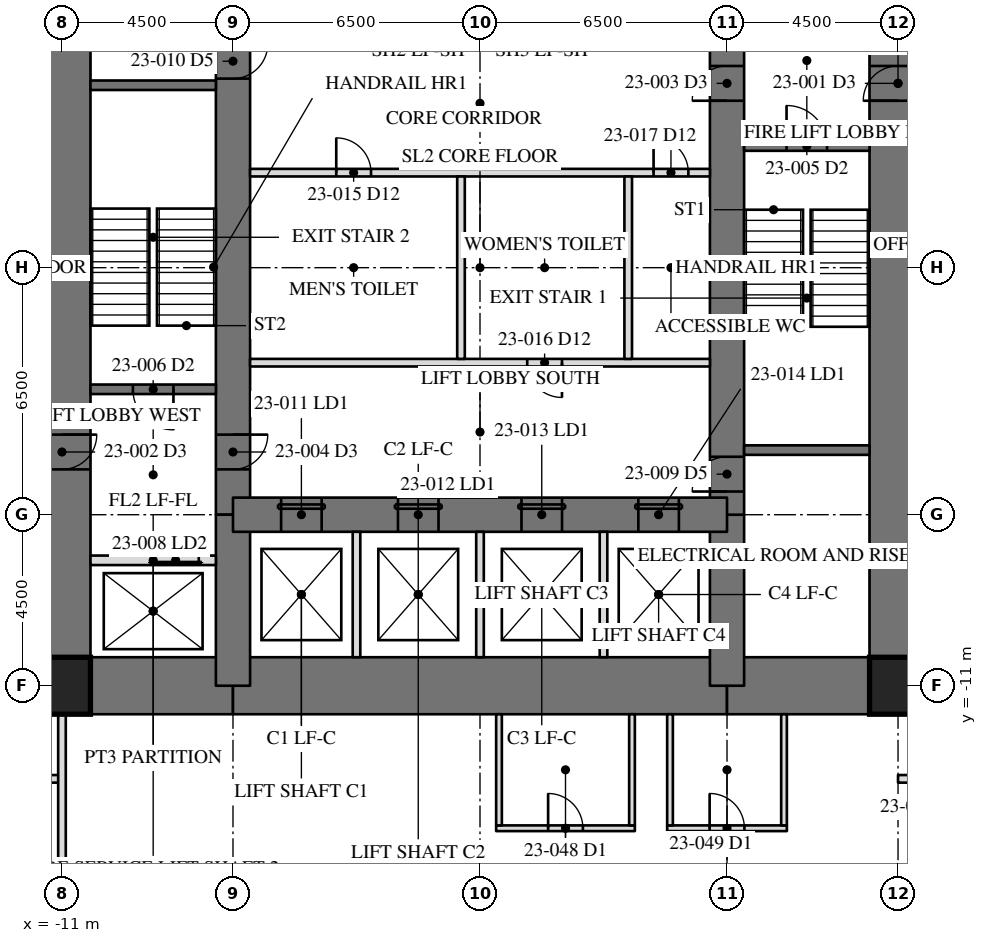
"""IFC4 building model, lengths in metres.
Left out: names, types, materials, properties, quantities, classifications, styles, units other than length and angle.
Written with IfcOpenShell. Run it as: python <this file> out.ifc"""

import sys

from ifc_helpers import new_model, si_unit, direction, frame, frame_2d, origin, origin_2d, place, context, subcontext, project, spatial, rectangle, hollow_rectangle, extrude, element, fill, save


model = new_model("IFC4")
c1 = context("Model", 3, precision=1e-05, world=origin(), true_north=direction((0.0, 1.0)))
c2 = subcontext(c1, "Body", "Model", "MODEL_VIEW")
j1 = project(units=[si_unit("LENGTHUNIT", "METRE"), si_unit("PLANEANGLEUNIT", "RADIAN")], contexts=[c1])
p1 = place(None, origin())
s1 = spatial("IfcSite", under=j1, at=p1, CompositionType="ELEMENT")
p2 = place(p1, origin())
s2 = spatial("IfcBuilding", under=s1, at=p2, CompositionType="ELEMENT")
p3 = place(p2, frame((0.0, 0.0, 100.8)))
s3 = spatial("IfcBuildingStorey", under=s2, at=p3, CompositionType="ELEMENT", Elevation=100.8)
p4 = place(p3, frame((11.0, -11.0, 0.0), z_axis=(0.0, 0.0, 1.0), x_axis=(0.0, 1.0, 0.0)))
e1 = element("IfcWall", 1, at=p4, inside=s3, PredefinedType="SHEAR", context=c2, shape_type="SweptSolid", body=[
    extrude(rectangle(XDim=22.0, YDim=1.5, at=frame_2d((11.0, 0.0))), origin(), (0.0, 0.0, 1.0), 4.1),
])
p5 = place(p4, frame((15.393, 0.0, 0.0)))
e2 = element("IfcOpeningElement", 2, at=p5, cuts=e1, PredefinedType="OPENING", context=c2, shape_type="SweptSolid", body=[
    extrude(rectangle(XDim=0.915, YDim=2.134, at=frame_2d((0.458, 1.067))), frame((0.0, 0.76, 0.0), z_axis=(0.0, -1.0, 0.0), x_axis=(1.0, 0.0, 0.0)), (0.0, 0.0, 1.0), 1.52),
])
p6 = place(p3, frame((-11.0, 11.0, 0.0), z_axis=(0.0, 0.0, 1.0), x_axis=(0.0, -1.0, 0.0)))
e3 = element("IfcWall", 3, at=p6, inside=s3, PredefinedType="SHEAR", context=c2, shape_type="SweptSolid", body=[
    extrude(rectangle(XDim=22.0, YDim=1.5, at=frame_2d((11.0, 0.0))), origin(), (0.0, 0.0, 1.0), 4.1),
])
p7 = place(p6, frame((15.393, 0.0, 0.0)))
e4 = element("IfcOpeningElement", 4, at=p7, cuts=e3, PredefinedType="OPENING", context=c2, shape_type="SweptSolid", body=[
    extrude(rectangle(XDim=0.915, YDim=2.134, at=frame_2d((0.458, 1.067))), frame((0.0, 0.76, 0.0), z_axis=(0.0, -1.0, 0.0), x_axis=(1.0, 0.0, 0.0)), (0.0, 0.0, 1.0), 1.52),
])
p8 = place(p3, frame((-11.0, -11.0, 0.0), z_axis=(0.0, 0.0, 1.0), x_axis=(1.0, 0.0, 0.0)))
e5 = element("IfcWall", 5, at=p8, inside=s3, PredefinedType="SHEAR", context=c2, shape_type="SweptSolid", body=[
    extrude(rectangle(XDim=4.5, YDim=1.5, at=frame_2d((2.25, 0.0))), origin(), (0.0, 0.0, 1.0), 4.1),
])
p9 = place(p3, frame((-6.5, -11.0, 0.0), z_axis=(0.0, 0.0, 1.0), x_axis=(1.0, 0.0, 0.0)))
e6 = element("IfcWall", 6, at=p9, inside=s3, PredefinedType="SHEAR", context=c2, shape_type="SweptSolid", body=[
    extrude(rectangle(XDim=13.0, YDim=1.5, at=frame_2d((6.5, 0.0))), origin(), (0.0, 0.0, 1.0), 4.1),
])
p10 = place(p3, frame((6.5, -11.0, 0.0), z_axis=(0.0, 0.0, 1.0), x_axis=(1.0, 0.0, 0.0)))
e7 = element("IfcWall", 7, at=p10, inside=s3, PredefinedType="SHEAR", context=c2, shape_type="SweptSolid", body=[
    extrude(rectangle(XDim=4.5, YDim=1.5, at=frame_2d((2.25, 0.0))), origin(), (0.0, 0.0, 1.0), 4.1),
])
p11 = place(p3, frame((6.5, -11.0, 0.0), z_axis=(0.0, 0.0, 1.0), x_axis=(0.0, 1.0, 0.0)))
e8 = element("IfcWall", 8, at=p11, inside=s3, PredefinedType="SHEAR", context=c2, shape_type="SweptSolid", body=[
    extrude(rectangle(XDim=4.5, YDim=0.9, at=frame_2d((2.25, 0.0))), origin(), (0.0, 0.0, 1.0), 4.1),
])
p12 = place(p3, frame((6.5, -6.5, 0.0), z_axis=(0.0, 0.0, 1.0), x_axis=(0.0, 1.0, 0.0)))
e9 = element("IfcWall", 9, at=p12, inside=s3, PredefinedType="SHEAR", context=c2, shape_type="SweptSolid", body=[
    extrude(rectangle(XDim=13.0, YDim=0.9, at=frame_2d((6.5, 0.0))), origin(), (0.0, 0.0, 1.0), 4.1),
])
p13 = place(p12, frame((10.893, 0.0, 0.0)))
e10 = element("IfcOpeningElement", 10, at=p13, cuts=e9, PredefinedType="OPENING", context=c2, shape_type="SweptSolid", body=[
    extrude(rectangle(XDim=0.915, YDim=2.134, at=frame_2d((0.458, 1.067))), frame((0.0, 0.46, 0.0), z_axis=(0.0, -1.0, 0.0), x_axis=(1.0, 0.0, 0.0)), (0.0, 0.0, 1.0), 0.92),
])
p14 = place(p12, frame((0.61, 0.0, 0.0)))
e11 = element("IfcOpeningElement", 11, at=p14, cuts=e9, PredefinedType="OPENING", context=c2, shape_type="SweptSolid", body=[
    extrude(rectangle(XDim=0.915, YDim=2.134, at=frame_2d((0.458, 1.067))), frame((0.0, 0.46, 0.0), z_axis=(0.0, -1.0, 0.0), x_axis=(1.0, 0.0, 0.0)), (0.0, 0.0, 1.0), 0.92),
])
p15 = place(p3, frame((-6.5, 6.5, 0.0), z_axis=(0.0, 0.0, 1.0), x_axis=(0.0, -1.0, 0.0)))
e12 = element("IfcWall", 12, at=p15, inside=s3, PredefinedType="SHEAR", context=c2, shape_type="SweptSolid", body=[
    extrude(rectangle(XDim=13.0, YDim=0.9, at=frame_2d((6.5, 0.0))), origin(), (0.0, 0.0, 1.0), 4.1),
])
p16 = place(p15, frame((10.893, 0.0, 0.0)))
e13 = element("IfcOpeningElement", 13, at=p16, cuts=e12, PredefinedType="OPENING", context=c2, shape_type="SweptSolid", body=[
    extrude(rectangle(XDim=0.915, YDim=2.134, at=frame_2d((0.458, 1.067))), frame((0.0, 0.46, 0.0), z_axis=(0.0, -1.0, 0.0), x_axis=(1.0, 0.0, 0.0)), (0.0, 0.0, 1.0), 0.92),
])
p17 = place(p15, frame((0.61, 0.0, 0.0)))
e14 = element("IfcOpeningElement", 14, at=p17, cuts=e12, PredefinedType="OPENING", context=c2, shape_type="SweptSolid", body=[
    extrude(rectangle(XDim=0.915, YDim=2.134, at=frame_2d((0.458, 1.067))), frame((0.0, 0.46, 0.0), z_axis=(0.0, -1.0, 0.0), x_axis=(1.0, 0.0, 0.0)), (0.0, 0.0, 1.0), 0.92),
])
p18 = place(p3, frame((-6.5, -6.5, 0.0), z_axis=(0.0, 0.0, 1.0), x_axis=(0.0, -1.0, 0.0)))
e15 = element("IfcWall", 15, at=p18, inside=s3, PredefinedType="SHEAR", context=c2, shape_type="SweptSolid", body=[
    extrude(rectangle(XDim=4.5, YDim=0.9, at=frame_2d((2.25, 0.0))), origin(), (0.0, 0.0, 1.0), 4.1),
])
p19 = place(p3, frame((-6.5, -6.5, 0.0), z_axis=(0.0, 0.0, 1.0), x_axis=(1.0, 0.0, 0.0)))
e16 = element("IfcWall", 16, at=p19, inside=s3, PredefinedType="SHEAR", context=c2, shape_type="SweptSolid", body=[
    extrude(rectangle(XDim=13.0, YDim=0.9, at=frame_2d((6.5, 0.0))), origin(), (0.0, 0.0, 1.0), 4.1),
])
p20 = place(p19, frame((1.267, 0.0, 0.0)))
e17 = element("IfcOpeningElement", 17, at=p20, cuts=e16, PredefinedType="OPENING", context=c2, shape_type="SweptSolid", body=[
    extrude(rectangle(XDim=1.067, YDim=2.134, at=frame_2d((0.533, 1.067))), frame((0.0, 0.46, 0.0), z_axis=(0.0, -1.0, 0.0), x_axis=(1.0, 0.0, 0.0)), (0.0, 0.0, 1.0), 0.92),
])
p21 = place(p19, frame((4.342, 0.0, 0.0)))
e18 = element("IfcOpeningElement", 18, at=p21, cuts=e16, PredefinedType="OPENING", context=c2, shape_type="SweptSolid", body=[
    extrude(rectangle(XDim=1.067, YDim=2.134, at=frame_2d((0.533, 1.067))), frame((0.0, 0.46, 0.0), z_axis=(0.0, -1.0, 0.0), x_axis=(1.0, 0.0, 0.0)), (0.0, 0.0, 1.0), 0.92),
])
p22 = place(p19, frame((7.592, 0.0, 0.0)))
e19 = element("IfcOpeningElement", 19, at=p22, cuts=e16, PredefinedType="OPENING", context=c2, shape_type="SweptSolid", body=[
    extrude(rectangle(XDim=1.067, YDim=2.134, at=frame_2d((0.533, 1.067))), frame((0.0, 0.46, 0.0), z_axis=(0.0, -1.0, 0.0), x_axis=(1.0, 0.0, 0.0)), (0.0, 0.0, 1.0), 0.92),
])
p23 = place(p19, frame((10.667, 0.0, 0.0)))
e20 = element("IfcOpeningElement", 20, at=p23, cuts=e16, PredefinedType="OPENING", context=c2, shape_type="SweptSolid", body=[
    extrude(rectangle(XDim=1.067, YDim=2.134, at=frame_2d((0.533, 1.067))), frame((0.0, 0.46, 0.0), z_axis=(0.0, -1.0, 0.0), x_axis=(1.0, 0.0, 0.0)), (0.0, 0.0, 1.0), 0.92),
])
for number, where, z_axis, x_axis in (
    (21, (-11.0, -11.0, 0.0), (0.0, 0.0, 1.0), (1.0, 0.0, 0.0)),
    (22, (11.0, -11.0, 0.0), (0.0, 0.0, 1.0), (1.0, 0.0, 0.0)),
):
    element("IfcColumn", number, at=place(p3, frame(where, z_axis=z_axis, x_axis=x_axis)), inside=s3, PredefinedType="COLUMN", context=c2, shape_type="SweptSolid", body=[
        extrude(hollow_rectangle(XDim=1.499, YDim=1.499, WallThickness=0.102, at=origin_2d()), origin(), (0.0, 0.0, 1.0), 4.1),
    ])
for number, where, z_axis, x_axis in (
    (23, (6.95, -4.8, 0.0), (0.0, 0.0, 1.0), (1.0, 0.0, 0.0)),
    (24, (-6.95, 4.8, 0.0), (0.0, 0.0, 1.0), (-1.0, 0.0, 0.0)),
):
    element("IfcWall", number, at=place(p3, frame(where, z_axis=z_axis, x_axis=x_axis)), inside=s3, PredefinedType="SOLIDWALL", context=c2, shape_type="SweptSolid", body=[
        extrude(rectangle(XDim=3.3, YDim=0.25, at=frame_2d((1.65, 0.0))), origin(), (0.0, 0.0, 1.0), 3.91),
    ])
p24 = place(p3, frame((6.95, 3.2, 0.0), z_axis=(0.0, 0.0, 1.0), x_axis=(1.0, 0.0, 0.0)))
e25 = element("IfcWall", 25, at=p24, inside=s3, PredefinedType="SOLIDWALL", context=c2, shape_type="SweptSolid", body=[
    extrude(rectangle(XDim=3.3, YDim=0.25, at=frame_2d((1.65, 0.0))), origin(), (0.0, 0.0, 1.0), 3.91),
])
p25 = place(p24, frame((1.116, 0.0, 0.0)))
e26 = element("IfcOpeningElement", 26, at=p25, cuts=e25, PredefinedType="OPENING", context=c2, shape_type="SweptSolid", body=[
    extrude(rectangle(XDim=1.067, YDim=2.134, at=frame_2d((0.533, 1.067))), frame((0.0, 0.135, 0.0), z_axis=(0.0, -1.0, 0.0), x_axis=(1.0, 0.0, 0.0)), (0.0, 0.0, 1.0), 0.27),
])
p26 = place(p3, frame((-6.95, -3.2, 0.0), z_axis=(0.0, 0.0, 1.0), x_axis=(-1.0, 0.0, 0.0)))
e27 = element("IfcWall", 27, at=p26, inside=s3, PredefinedType="SOLIDWALL", context=c2, shape_type="SweptSolid", body=[
    extrude(rectangle(XDim=3.3, YDim=0.25, at=frame_2d((1.65, 0.0))), origin(), (0.0, 0.0, 1.0), 3.91),
])
p27 = place(p26, frame((1.116, 0.0, 0.0)))
e28 = element("IfcOpeningElement", 28, at=p27, cuts=e27, PredefinedType="OPENING", context=c2, shape_type="SweptSolid", body=[
    extrude(rectangle(XDim=1.067, YDim=2.134, at=frame_2d((0.533, 1.067))), frame((0.0, 0.135, 0.0), z_axis=(0.0, -1.0, 0.0), x_axis=(1.0, 0.0, 0.0)), (0.0, 0.0, 1.0), 0.27),
])
p28 = place(p3, frame((-6.95, -7.7, 0.0), z_axis=(0.0, 0.0, 1.0), x_axis=(-1.0, 0.0, 0.0)))
e29 = element("IfcWall", 29, at=p28, inside=s3, PredefinedType="PARTITIONING", context=c2, shape_type="SweptSolid", body=[
    extrude(rectangle(XDim=3.3, YDim=0.25, at=frame_2d((1.65, 0.0))), origin(), (0.0, 0.0, 1.0), 3.91),
])
p29 = place(p28, frame((0.45, 0.0, 0.0)))
e30 = element("IfcOpeningElement", 30, at=p29, cuts=e29, PredefinedType="OPENING", context=c2, shape_type="SweptSolid", body=[
    extrude(rectangle(XDim=1.219, YDim=2.134, at=frame_2d((0.609, 1.067))), frame((0.0, 0.135, 0.0), z_axis=(0.0, -1.0, 0.0), x_axis=(1.0, 0.0, 0.0)), (0.0, 0.0, 1.0), 0.27),
])
p30 = place(p3, frame((-6.05, 2.5, 0.0), z_axis=(0.0, 0.0, 1.0), x_axis=(1.0, 0.0, 0.0)))
e31 = element("IfcWall", 31, at=p30, inside=s3, PredefinedType="PARTITIONING", context=c2, shape_type="SweptSolid", body=[
    extrude(rectangle(XDim=12.1, YDim=0.2, at=frame_2d((6.05, 0.0))), origin(), (0.0, 0.0, 1.0), 3.91),
])
p31 = place(p30, frame((2.268, 0.0, 0.0)))
e32 = element("IfcOpeningElement", 32, at=p31, cuts=e31, PredefinedType="OPENING", context=c2, shape_type="SweptSolid", body=[
    extrude(rectangle(XDim=0.915, YDim=2.134, at=frame_2d((0.458, 1.067))), frame((0.0, 0.11, 0.0), z_axis=(0.0, -1.0, 0.0), x_axis=(1.0, 0.0, 0.0)), (0.0, 0.0, 1.0), 0.22),
])
p32 = place(p30, frame((10.617, 0.0, 0.0)))
e33 = element("IfcOpeningElement", 33, at=p32, cuts=e31, PredefinedType="OPENING", context=c2, shape_type="SweptSolid", body=[
    extrude(rectangle(XDim=0.915, YDim=2.134, at=frame_2d((0.458, 1.067))), frame((0.0, 0.11, 0.0), z_axis=(0.0, -1.0, 0.0), x_axis=(1.0, 0.0, 0.0)), (0.0, 0.0, 1.0), 0.22),
])
p33 = place(p3, frame((6.05, -2.5, 0.0), z_axis=(0.0, 0.0, 1.0), x_axis=(-1.0, 0.0, 0.0)))
e34 = element("IfcWall", 34, at=p33, inside=s3, PredefinedType="PARTITIONING", context=c2, shape_type="SweptSolid", body=[
    extrude(rectangle(XDim=12.1, YDim=0.2, at=frame_2d((6.05, 0.0))), origin(), (0.0, 0.0, 1.0), 3.91),
])
p34 = place(p33, frame((3.893, 0.0, 0.0)))
e35 = element("IfcOpeningElement", 35, at=p34, cuts=e34, PredefinedType="OPENING", context=c2, shape_type="SweptSolid", body=[
    extrude(rectangle(XDim=0.915, YDim=2.134, at=frame_2d((0.458, 1.067))), frame((0.0, 0.11, 0.0), z_axis=(0.0, -1.0, 0.0), x_axis=(1.0, 0.0, 0.0)), (0.0, 0.0, 1.0), 0.22),
])
for number, where, z_axis, x_axis in (
    (36, (-3.25, -10.25, 0.0), (0.0, 0.0, 1.0), (0.0, 1.0, 0.0)),
    (37, (0.0, -10.25, 0.0), (0.0, 0.0, 1.0), (0.0, 1.0, 0.0)),
    (38, (3.25, -10.25, 0.0), (0.0, 0.0, 1.0), (0.0, 1.0, 0.0)),
):
    element("IfcWall", number, at=place(p3, frame(where, z_axis=z_axis, x_axis=x_axis)), inside=s3, PredefinedType="PARTITIONING", context=c2, shape_type="SweptSolid", body=[
        extrude(rectangle(XDim=3.3, YDim=0.2, at=frame_2d((1.65, 0.0))), origin(), (0.0, 0.0, 1.0), 3.91),
    ])
for number, where, z_axis, x_axis in (
    (39, (-0.5, -2.4, 0.0), (0.0, 0.0, 1.0), (0.0, 1.0, 0.0)),
    (40, (3.9, -2.4, 0.0), (0.0, 0.0, 1.0), (0.0, 1.0, 0.0)),
):
    element("IfcWall", number, at=place(p3, frame(where, z_axis=z_axis, x_axis=x_axis)), inside=s3, PredefinedType="PARTITIONING", context=c2, shape_type="SweptSolid", body=[
        extrude(rectangle(XDim=4.8, YDim=0.2, at=frame_2d((2.4, 0.0))), origin(), (0.0, 0.0, 1.0), 3.91),
    ])
for number, where, z_axis, x_axis in (
    (41, (11.0, -13.45, 0.0), (0.0, 0.0, 1.0), (1.0, 0.0, 0.0)),
    (42, (-11.0, -13.45, 0.0), (0.0, 0.0, 1.0), (-1.0, 0.0, 0.0)),
):
    element("IfcWall", number, at=place(p3, frame(where, z_axis=z_axis, x_axis=x_axis)), inside=s3, PredefinedType="PARTITIONING", context=c2, shape_type="SweptSolid", body=[
        extrude(rectangle(XDim=2.55, YDim=0.2, at=frame_2d((1.275, 0.0))), origin(), (0.0, 0.0, 1.0), 3.91),
    ])
p35 = place(p3, frame((-11.0, -11.75, 0.0), z_axis=(0.0, 0.0, 1.0), x_axis=(0.0, -1.0, 0.0)))
e43 = element("IfcWall", 43, at=p35, inside=s3, PredefinedType="PARTITIONING", context=c2, shape_type="SweptSolid", body=[
    extrude(rectangle(XDim=10.665, YDim=0.2, at=frame_2d((5.333, 0.0))), origin(), (0.0, 0.0, 1.0), 3.326),
])
p36 = place(p3, frame((0.425, -14.75, 0.0), z_axis=(0.0, 0.0, 1.0), x_axis=(1.0, 0.0, 0.0)))
e44 = element("IfcWall", 44, at=p36, inside=s3, PredefinedType="PARTITIONING", context=c2, shape_type="SweptSolid", body=[
    extrude(rectangle(XDim=3.65, YDim=0.15, at=frame_2d((1.825, 0.0))), origin(), (0.0, 0.0, 1.0), 3.91),
])
p37 = place(p36, frame((1.367, 0.0, 0.0)))
e45 = element("IfcOpeningElement", 45, at=p37, cuts=e44, PredefinedType="OPENING", context=c2, shape_type="SweptSolid", body=[
    extrude(rectangle(XDim=0.915, YDim=2.134, at=frame_2d((0.458, 1.067))), frame((0.0, 0.085, 0.0), z_axis=(0.0, -1.0, 0.0), x_axis=(1.0, 0.0, 0.0)), (0.0, 0.0, 1.0), 0.17),
])
for number, where, z_axis, x_axis in (
    (46, (0.5, -14.675, 0.0), (0.0, 0.0, 1.0), (0.0, 1.0, 0.0)),
    (47, (4.0, -14.675, 0.0), (0.0, 0.0, 1.0), (0.0, 1.0, 0.0)),
):
    element("IfcWall", number, at=place(p3, frame(where, z_axis=z_axis, x_axis=x_axis)), inside=s3, PredefinedType="PARTITIONING", context=c2, shape_type="SweptSolid", body=[
        extrude(rectangle(XDim=2.925, YDim=0.15, at=frame_2d((1.462, 0.0))), origin(), (0.0, 0.0, 1.0), 3.91),
    ])
p38 = place(p3, frame((4.925, -14.75, 0.0), z_axis=(0.0, 0.0, 1.0), x_axis=(1.0, 0.0, 0.0)))
e48 = element("IfcWall", 48, at=p38, inside=s3, PredefinedType="PARTITIONING", context=c2, shape_type="SweptSolid", body=[
    extrude(rectangle(XDim=3.15, YDim=0.15, at=frame_2d((1.575, 0.0))), origin(), (0.0, 0.0, 1.0), 3.91),
])
p39 = place(p38, frame((1.117, 0.0, 0.0)))
e49 = element("IfcOpeningElement", 49, at=p39, cuts=e48, PredefinedType="OPENING", context=c2, shape_type="SweptSolid", body=[
    extrude(rectangle(XDim=0.915, YDim=2.134, at=frame_2d((0.458, 1.067))), frame((0.0, 0.085, 0.0), z_axis=(0.0, -1.0, 0.0), x_axis=(1.0, 0.0, 0.0)), (0.0, 0.0, 1.0), 0.17),
])
for number, where, z_axis, x_axis in (
    (50, (5.0, -14.675, 0.0), (0.0, 0.0, 1.0), (0.0, 1.0, 0.0)),
    (51, (8.0, -14.675, 0.0), (0.0, 0.0, 1.0), (0.0, 1.0, 0.0)),
):
    element("IfcWall", number, at=place(p3, frame(where, z_axis=z_axis, x_axis=x_axis)), inside=s3, PredefinedType="PARTITIONING", context=c2, shape_type="SweptSolid", body=[
        extrude(rectangle(XDim=2.925, YDim=0.15, at=frame_2d((1.462, 0.0))), origin(), (0.0, 0.0, 1.0), 3.91),
    ])
p40 = place(p13, origin())
e52 = element("IfcDoor", 52, at=p40, inside=s3, OperationType="SINGLE_SWING_RIGHT", PredefinedType="DOOR", context=c2, shape_type="SweptSolid", body=[
    extrude(rectangle(XDim=0.915, YDim=2.134, at=frame_2d((0.458, 1.067))), frame((0.0, -0.375, 0.0), z_axis=(0.0, -1.0, 0.0), x_axis=(1.0, 0.0, 0.0)), (0.0, 0.0, 1.0), 0.05),
])
fill(e10, e52)
p41 = place(p16, origin())
e53 = element("IfcDoor", 53, at=p41, inside=s3, OperationType="SINGLE_SWING_RIGHT", PredefinedType="DOOR", context=c2, shape_type="SweptSolid", body=[
    extrude(rectangle(XDim=0.915, YDim=2.134, at=frame_2d((0.458, 1.067))), frame((0.0, -0.375, 0.0), z_axis=(0.0, -1.0, 0.0), x_axis=(1.0, 0.0, 0.0)), (0.0, 0.0, 1.0), 0.05),
])
fill(e13, e53)
p42 = place(p25, origin())
e54 = element("IfcDoor", 54, at=p42, inside=s3, OperationType="SINGLE_SWING_LEFT", PredefinedType="DOOR", context=c2, shape_type="SweptSolid", body=[
    extrude(rectangle(XDim=1.067, YDim=2.134, at=frame_2d((0.533, 1.067))), frame((0.0, 0.025, 0.0), z_axis=(0.0, -1.0, 0.0), x_axis=(1.0, 0.0, 0.0)), (0.0, 0.0, 1.0), 0.05),
])
fill(e26, e54)
p43 = place(p27, origin())
e55 = element("IfcDoor", 55, at=p43, inside=s3, OperationType="SINGLE_SWING_LEFT", PredefinedType="DOOR", context=c2, shape_type="SweptSolid", body=[
    extrude(rectangle(XDim=1.067, YDim=2.134, at=frame_2d((0.533, 1.067))), frame((0.0, 0.025, 0.0), z_axis=(0.0, -1.0, 0.0), x_axis=(1.0, 0.0, 0.0)), (0.0, 0.0, 1.0), 0.05),
])
fill(e28, e55)
p44 = place(p29, origin())
e56 = element("IfcDoor", 56, at=p44, inside=s3, OperationType="SLIDING_TO_LEFT", PredefinedType="DOOR", context=c2, shape_type="SweptSolid", body=[
    extrude(rectangle(XDim=1.219, YDim=2.134, at=frame_2d((0.609, 1.067))), frame((0.0, 0.025, 0.0), z_axis=(0.0, -1.0, 0.0), x_axis=(1.0, 0.0, 0.0)), (0.0, 0.0, 1.0), 0.05),
])
fill(e30, e56)
p45 = place(p14, origin())
e57 = element("IfcDoor", 57, at=p45, inside=s3, OperationType="SINGLE_SWING_RIGHT", PredefinedType="DOOR", context=c2, shape_type="SweptSolid", body=[
    extrude(rectangle(XDim=0.915, YDim=2.134, at=frame_2d((0.458, 1.067))), frame((0.0, -0.375, 0.0), z_axis=(0.0, -1.0, 0.0), x_axis=(1.0, 0.0, 0.0)), (0.0, 0.0, 1.0), 0.05),
])
fill(e11, e57)
p46 = place(p17, origin())
e58 = element("IfcDoor", 58, at=p46, inside=s3, OperationType="SINGLE_SWING_RIGHT", PredefinedType="DOOR", context=c2, shape_type="SweptSolid", body=[
    extrude(rectangle(XDim=0.915, YDim=2.134, at=frame_2d((0.458, 1.067))), frame((0.0, -0.375, 0.0), z_axis=(0.0, -1.0, 0.0), x_axis=(1.0, 0.0, 0.0)), (0.0, 0.0, 1.0), 0.05),
])
fill(e14, e58)
p47 = place(p20, origin())
e59 = element("IfcDoor", 59, at=p47, inside=s3, OperationType="SLIDING_TO_LEFT", PredefinedType="DOOR", context=c2, shape_type="SweptSolid", body=[
    extrude(rectangle(XDim=1.067, YDim=2.134, at=frame_2d((0.533, 1.067))), frame((0.0, -0.375, 0.0), z_axis=(0.0, -1.0, 0.0), x_axis=(1.0, 0.0, 0.0)), (0.0, 0.0, 1.0), 0.05),
])
fill(e17, e59)
p48 = place(p21, origin())
e60 = element("IfcDoor", 60, at=p48, inside=s3, OperationType="SLIDING_TO_LEFT", PredefinedType="DOOR", context=c2, shape_type="SweptSolid", body=[
    extrude(rectangle(XDim=1.067, YDim=2.134, at=frame_2d((0.533, 1.067))), frame((0.0, -0.375, 0.0), z_axis=(0.0, -1.0, 0.0), x_axis=(1.0, 0.0, 0.0)), (0.0, 0.0, 1.0), 0.05),
])
fill(e18, e60)
p49 = place(p22, origin())
e61 = element("IfcDoor", 61, at=p49, inside=s3, OperationType="SLIDING_TO_LEFT", PredefinedType="DOOR", context=c2, shape_type="SweptSolid", body=[
    extrude(rectangle(XDim=1.067, YDim=2.134, at=frame_2d((0.533, 1.067))), frame((0.0, -0.375, 0.0), z_axis=(0.0, -1.0, 0.0), x_axis=(1.0, 0.0, 0.0)), (0.0, 0.0, 1.0), 0.05),
])
fill(e19, e61)
p50 = place(p23, origin())
e62 = element("IfcDoor", 62, at=p50, inside=s3, OperationType="SLIDING_TO_LEFT", PredefinedType="DOOR", context=c2, shape_type="SweptSolid", body=[
    extrude(rectangle(XDim=1.067, YDim=2.134, at=frame_2d((0.533, 1.067))), frame((0.0, -0.375, 0.0), z_axis=(0.0, -1.0, 0.0), x_axis=(1.0, 0.0, 0.0)), (0.0, 0.0, 1.0), 0.05),
])
fill(e20, e62)
p51 = place(p31, origin())
e63 = element("IfcDoor", 63, at=p51, inside=s3, OperationType="SINGLE_SWING_LEFT", PredefinedType="DOOR", context=c2, shape_type="SweptSolid", body=[
    extrude(rectangle(XDim=0.915, YDim=2.134, at=frame_2d((0.458, 1.067))), frame((0.0, 0.025, 0.0), z_axis=(0.0, -1.0, 0.0), x_axis=(1.0, 0.0, 0.0)), (0.0, 0.0, 1.0), 0.05),
])
fill(e32, e63)
p52 = place(p34, origin())
e64 = element("IfcDoor", 64, at=p52, inside=s3, OperationType="SINGLE_SWING_LEFT", PredefinedType="DOOR", context=c2, shape_type="SweptSolid", body=[
    extrude(rectangle(XDim=0.915, YDim=2.134, at=frame_2d((0.458, 1.067))), frame((0.0, 0.025, 0.0), z_axis=(0.0, -1.0, 0.0), x_axis=(1.0, 0.0, 0.0)), (0.0, 0.0, 1.0), 0.05),
])
fill(e35, e64)
p53 = place(p32, origin())
e65 = element("IfcDoor", 65, at=p53, inside=s3, OperationType="SINGLE_SWING_LEFT", PredefinedType="DOOR", context=c2, shape_type="SweptSolid", body=[
    extrude(rectangle(XDim=0.915, YDim=2.134, at=frame_2d((0.458, 1.067))), frame((0.0, 0.025, 0.0), z_axis=(0.0, -1.0, 0.0), x_axis=(1.0, 0.0, 0.0)), (0.0, 0.0, 1.0), 0.05),
])
fill(e33, e65)
p54 = place(p37, origin())
e66 = element("IfcDoor", 66, at=p54, inside=s3, OperationType="SINGLE_SWING_LEFT", PredefinedType="DOOR", context=c2, shape_type="SweptSolid", body=[
    extrude(rectangle(XDim=0.915, YDim=2.134, at=frame_2d((0.458, 1.067))), frame((0.0, 0.025, 0.0), z_axis=(0.0, -1.0, 0.0), x_axis=(1.0, 0.0, 0.0)), (0.0, 0.0, 1.0), 0.05),
])
fill(e45, e66)
p55 = place(p39, origin())
e67 = element("IfcDoor", 67, at=p55, inside=s3, OperationType="SINGLE_SWING_LEFT", PredefinedType="DOOR", context=c2, shape_type="SweptSolid", body=[
    extrude(rectangle(XDim=0.915, YDim=2.134, at=frame_2d((0.458, 1.067))), frame((0.0, 0.025, 0.0), z_axis=(0.0, -1.0, 0.0), x_axis=(1.0, 0.0, 0.0)), (0.0, 0.0, 1.0), 0.05),
])
fill(e49, e67)
save(model, sys.argv[1])
